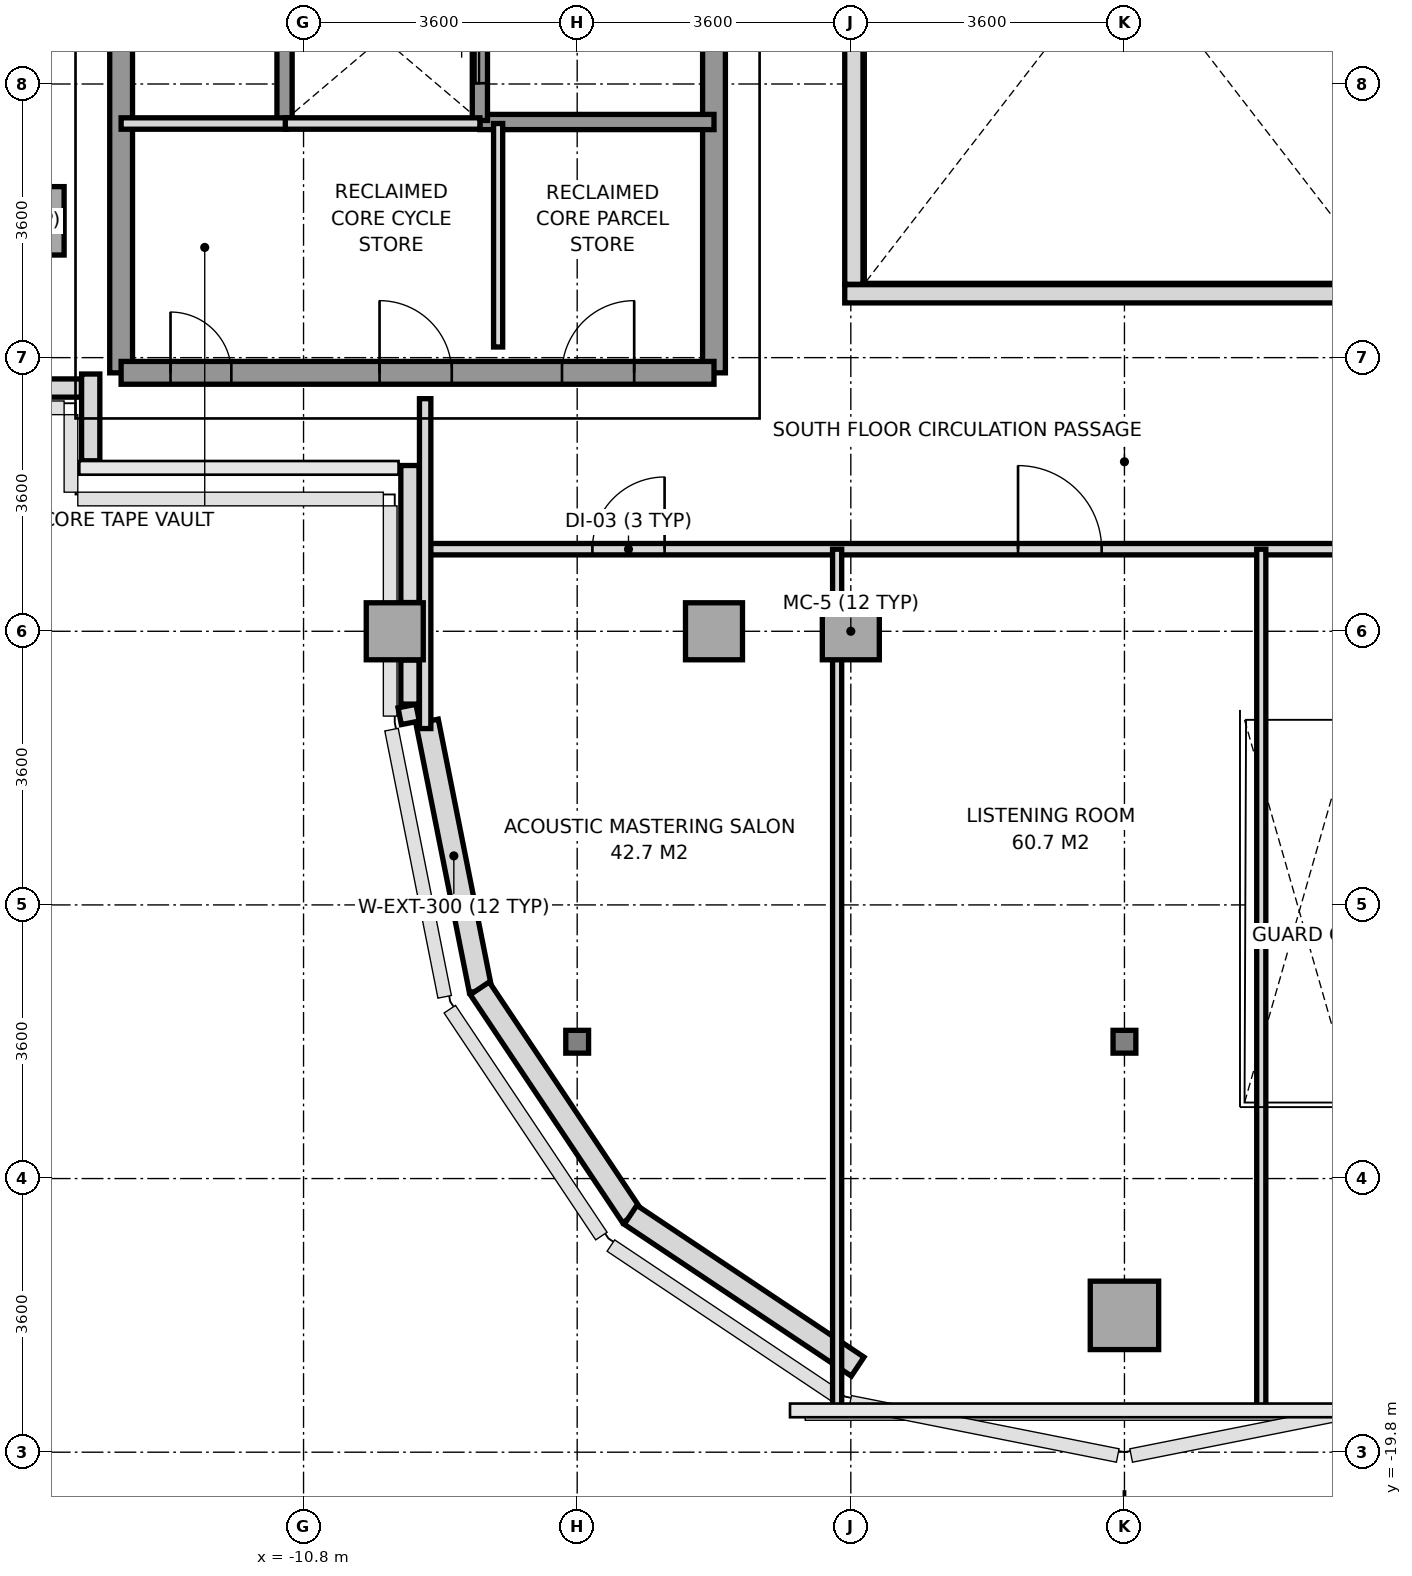
"""IFC4 building model, lengths in metres.
Left out: names, types, materials, properties, quantities, classifications, styles, units other than length and angle.
Written with IfcOpenShell. Run it as: python <this file> out.ifc"""

import sys

from ifc_helpers import new_model, si_unit, direction, frame, frame_2d, origin, origin_2d, place, context, subcontext, project, spatial, rectangle, i_section, extrude, source, transform, mapped, element, fill, save


model = new_model("IFC4")
c1 = context("Model", 3, precision=1e-05, world=origin(), true_north=direction((0.0, 1.0)))
c2 = subcontext(c1, "Body", "Model", "MODEL_VIEW")
j1 = project(units=[si_unit("LENGTHUNIT", "METRE"), si_unit("PLANEANGLEUNIT", "RADIAN")], contexts=[c1])
p1 = place(None, origin())
s1 = spatial("IfcSite", under=j1, at=p1, CompositionType="ELEMENT")
p2 = place(p1, origin())
s2 = spatial("IfcBuilding", under=s1, at=p2, CompositionType="ELEMENT")
p3 = place(p2, frame((0.0, 0.0, 255.6)))
s3 = spatial("IfcBuildingStorey", under=s2, at=p3, CompositionType="ELEMENT", Elevation=255.6)
m1 = source(origin(), c2, "Body", "SweptSolid", [
    extrude(rectangle(XDim=0.9, YDim=0.9, at=origin_2d()), origin(), (0.0, 0.0, 1.0), 3.01),
])
p4 = place(p3, frame((-14.4, -3.6, 0.0), z_axis=(0.0, 0.0, 1.0), x_axis=(1.0, 0.0, 0.0)))
e1 = element("IfcColumn", 1, at=p4, inside=s3, PredefinedType="COLUMN", context=c2, shape_type="MappedRepresentation", body=[
    mapped(m1, transform((0.0, 0.0, 0.0), x_axis=(1.0, 0.0, 0.0), y_axis=(0.0, 1.0, 0.0), z_axis=(0.0, 0.0, 1.0), scale=1.0)),
])
m2 = source(origin(), c2, "Body", "SweptSolid", [
    extrude(rectangle(XDim=0.75, YDim=0.75, at=origin_2d()), origin(), (0.0, 0.0, 1.0), 3.01),
])
p5 = place(p3, frame((-9.6, -9.0, 0.0), z_axis=(0.0, 0.0, 1.0), x_axis=(1.0, 0.0, 0.0)))
e2 = element("IfcColumn", 2, at=p5, inside=s3, PredefinedType="COLUMN", context=c2, shape_type="MappedRepresentation", body=[
    mapped(m2, transform((0.0, 0.0, 0.0), x_axis=(1.0, 0.0, 0.0), y_axis=(0.0, 1.0, 0.0), z_axis=(0.0, 0.0, 1.0), scale=1.0)),
])
m3 = source(origin(), c2, "Body", "SweptSolid", [
    extrude(i_section(OverallWidth=0.3, OverallDepth=0.3, WebThickness=0.011, FlangeThickness=0.019, at=origin_2d()), origin(), (0.0, 0.0, 1.0), 3.01),
])
p6 = place(p3, frame((-7.2, -14.4, 0.0), z_axis=(0.0, 0.0, 1.0), x_axis=(1.0, 0.0, 0.0)))
e3 = element("IfcColumn", 3, at=p6, inside=s3, PredefinedType="COLUMN", context=c2, shape_type="MappedRepresentation", body=[
    mapped(m3, transform((0.0, 0.0, 0.0), x_axis=(1.0, 0.0, 0.0), y_axis=(0.0, 1.0, 0.0), z_axis=(0.0, 0.0, 1.0), scale=1.0)),
])
for number, where, z_axis, x_axis in (
    (4, (-5.4, -9.0, 0.0), (0.0, 0.0, 1.0), (1.0, 0.0, 0.0)),
    (5, (-3.6, -9.0, 0.0), (0.0, 0.0, 1.0), (1.0, 0.0, 0.0)),
):
    element("IfcColumn", number, at=place(p3, frame(where, z_axis=z_axis, x_axis=x_axis)), inside=s3, PredefinedType="COLUMN", context=c2, shape_type="MappedRepresentation", body=[
        mapped(m2, transform((0.0, 0.0, 0.0), x_axis=(1.0, 0.0, 0.0), y_axis=(0.0, 1.0, 0.0), z_axis=(0.0, 0.0, 1.0), scale=1.0)),
    ])
p7 = place(p3, frame((0.0, -18.0, 0.0), z_axis=(0.0, 0.0, 1.0), x_axis=(1.0, 0.0, 0.0)))
e6 = element("IfcColumn", 6, at=p7, inside=s3, PredefinedType="COLUMN", context=c2, shape_type="MappedRepresentation", body=[
    mapped(m1, transform((0.0, 0.0, 0.0), x_axis=(1.0, 0.0, 0.0), y_axis=(0.0, 1.0, 0.0), z_axis=(0.0, 0.0, 1.0), scale=1.0)),
])
p8 = place(p3, frame((0.0, -14.4, 0.0), z_axis=(0.0, 0.0, 1.0), x_axis=(1.0, 0.0, 0.0)))
e7 = element("IfcColumn", 7, at=p8, inside=s3, PredefinedType="COLUMN", context=c2, shape_type="MappedRepresentation", body=[
    mapped(m3, transform((0.0, 0.0, 0.0), x_axis=(1.0, 0.0, 0.0), y_axis=(0.0, 1.0, 0.0), z_axis=(0.0, 0.0, 1.0), scale=1.0)),
])
p9 = place(p3, frame((-9.175, -10.185, 0.0), z_axis=(0.0, 0.0, 1.0), x_axis=(0.195114232679, -0.980780523974, 0.0)))
e8 = element("IfcWall", 8, at=p9, inside=s3, PredefinedType="SOLIDWALL", context=c2, shape_type="SweptSolid", body=[
    extrude(rectangle(XDim=3.609, YDim=0.3, at=frame_2d((1.804, 0.0))), origin(), (0.0, 0.0, 1.0), 3.01),
])
p10 = place(p3, frame((-8.482, -13.698, 0.0), z_axis=(0.0, 0.0, 1.0), x_axis=(0.555574187116, -0.831466970246, 0.0)))
e9 = element("IfcWall", 9, at=p10, inside=s3, PredefinedType="SOLIDWALL", context=c2, shape_type="SweptSolid", body=[
    extrude(rectangle(XDim=3.609, YDim=0.3, at=frame_2d((1.804, 0.0))), origin(), (0.0, 0.0, 1.0), 2.61),
])
p11 = place(p3, frame((-6.498, -16.677, 0.0), z_axis=(0.0, 0.0, 1.0), x_axis=(0.831443568068, -0.555609208993, 0.0)))
e10 = element("IfcWall", 10, at=p11, inside=s3, PredefinedType="SOLIDWALL", context=c2, shape_type="SweptSolid", body=[
    extrude(rectangle(XDim=3.594, YDim=0.3, at=frame_2d((1.797, 0.0))), origin(), (0.0, 0.0, 1.0), 3.01),
])
p12 = place(p3, frame((-9.395, -10.204, 0.0), z_axis=(0.0, 0.0, 1.0), x_axis=(-0.194859894132, 0.980831087221, 0.0)))
e11 = element("IfcWall", 11, at=p12, inside=s3, PredefinedType="PARAPET", context=c2, shape_type="SweptSolid", body=[
    extrude(rectangle(XDim=0.224, YDim=0.24, at=frame_2d((0.112, 0.0))), origin(), (0.0, 0.0, 1.0), 1.15),
])
p13 = place(p3, frame((-9.4, -9.958, 0.0), z_axis=(0.0, 0.0, 1.0), x_axis=(0.0, 1.0, 0.0)))
e12 = element("IfcWall", 12, at=p13, inside=s3, PredefinedType="PARAPET", context=c2, shape_type="SweptSolid", body=[
    extrude(rectangle(XDim=0.58, YDim=0.24, at=frame_2d((0.29, 0.0))), origin(), (0.0, 0.0, 1.0), 1.15),
])
p14 = place(p3, frame((-9.4, -8.622, 0.0), z_axis=(0.0, 0.0, 1.0), x_axis=(0.0, 1.0, 0.0)))
e13 = element("IfcWall", 13, at=p14, inside=s3, PredefinedType="PARAPET", context=c2, shape_type="SweptSolid", body=[
    extrude(rectangle(XDim=1.803, YDim=0.24, at=frame_2d((0.901, 0.0))), origin(), (0.0, 0.0, 1.0), 1.15),
])
p15 = place(p3, frame((-13.6, -6.757, 0.0), z_axis=(0.0, 0.0, 1.0), x_axis=(0.0, 1.0, 0.0)))
e14 = element("IfcWall", 14, at=p15, inside=s3, PredefinedType="PARAPET", context=c2, shape_type="SweptSolid", body=[
    extrude(rectangle(XDim=1.142, YDim=0.24, at=frame_2d((0.571, 0.0))), origin(), (0.0, 0.0, 1.0), 1.15),
])
p16 = place(p3, frame((-13.723, -5.8, 0.0), z_axis=(0.0, 0.0, 1.0), x_axis=(-1.0, 0.0, 0.0)))
e15 = element("IfcWall", 15, at=p16, inside=s3, PredefinedType="PARAPET", context=c2, shape_type="SweptSolid", body=[
    extrude(rectangle(XDim=1.077, YDim=0.24, at=frame_2d((0.539, 0.0))), origin(), (0.0, 0.0, 1.0), 1.15),
])
p17 = place(p3, frame((-13.2, -5.6, 0.0), z_axis=(0.0, 0.0, 1.0), x_axis=(0.0, 1.0, 0.0)))
e16 = element("IfcWall", 16, at=p17, inside=s3, PredefinedType="SHEAR", context=c2, shape_type="SweptSolid", body=[
    extrude(rectangle(XDim=11.2, YDim=0.3, at=frame_2d((5.6, 0.0))), origin(), (0.0, 0.0, 1.0), 3.01),
])
p18 = place(p3, frame((-5.4, -5.6, 0.0), z_axis=(0.0, 0.0, 1.0), x_axis=(0.0, 1.0, 0.0)))
e17 = element("IfcWall", 17, at=p18, inside=s3, PredefinedType="SHEAR", context=c2, shape_type="SweptSolid", body=[
    extrude(rectangle(XDim=12.5, YDim=0.3, at=frame_2d((6.25, 0.0))), origin(), (0.0, 0.0, 1.0), 3.01),
])
p19 = place(p18, frame((4.55, 0.0, 0.0)))
e18 = element("IfcOpeningElement", 18, at=p19, cuts=e17, PredefinedType="OPENING", context=c2, shape_type="SweptSolid", body=[
    extrude(rectangle(XDim=1.2, YDim=2.2, at=frame_2d((0.6, 1.1))), frame((0.0, 0.16, 0.0), z_axis=(0.0, -1.0, 0.0), x_axis=(1.0, 0.0, 0.0)), (0.0, 0.0, 1.0), 0.32),
])
p20 = place(p18, frame((10.45, 0.0, 0.0)))
e19 = element("IfcOpeningElement", 19, at=p20, cuts=e17, PredefinedType="OPENING", context=c2, shape_type="SweptSolid", body=[
    extrude(rectangle(XDim=1.2, YDim=2.2, at=frame_2d((0.6, 1.1))), frame((0.0, 0.16, 0.0), z_axis=(0.0, -1.0, 0.0), x_axis=(1.0, 0.0, 0.0)), (0.0, 0.0, 1.0), 0.32),
])
p21 = place(p18, frame((6.86, 0.0, 0.0)))
e20 = element("IfcOpeningElement", 20, at=p21, cuts=e17, PredefinedType="OPENING", context=c2, shape_type="SweptSolid", body=[
    extrude(rectangle(XDim=0.8, YDim=2.1, at=frame_2d((0.4, 1.05))), frame((0.0, 0.16, 0.0), z_axis=(0.0, -1.0, 0.0), x_axis=(1.0, 0.0, 0.0)), (0.0, 0.0, 1.0), 0.32),
])
p22 = place(p18, frame((7.88, 0.0, 0.0)))
e21 = element("IfcOpeningElement", 21, at=p22, cuts=e17, PredefinedType="OPENING", context=c2, shape_type="SweptSolid", body=[
    extrude(rectangle(XDim=0.8, YDim=2.1, at=frame_2d((0.4, 1.05))), frame((0.0, 0.16, 0.0), z_axis=(0.0, -1.0, 0.0), x_axis=(1.0, 0.0, 0.0)), (0.0, 0.0, 1.0), 0.32),
])
p23 = place(p3, frame((-13.2, -5.6, 0.0), z_axis=(0.0, 0.0, 1.0), x_axis=(1.0, 0.0, 0.0)))
e22 = element("IfcWall", 22, at=p23, inside=s3, PredefinedType="SHEAR", context=c2, shape_type="SweptSolid", body=[
    extrude(rectangle(XDim=7.8, YDim=0.3, at=frame_2d((3.9, 0.0))), origin(), (0.0, 0.0, 1.0), 3.01),
])
p24 = place(p23, frame((0.65, 0.0, 0.0)))
e23 = element("IfcOpeningElement", 23, at=p24, cuts=e22, PredefinedType="OPENING", context=c2, shape_type="SweptSolid", body=[
    extrude(rectangle(XDim=0.8, YDim=2.1, at=frame_2d((0.4, 1.05))), frame((0.0, 0.16, 0.0), z_axis=(0.0, -1.0, 0.0), x_axis=(1.0, 0.0, 0.0)), (0.0, 0.0, 1.0), 0.32),
])
p25 = place(p23, frame((3.4, 0.0, 0.0)))
e24 = element("IfcOpeningElement", 24, at=p25, cuts=e22, PredefinedType="OPENING", context=c2, shape_type="SweptSolid", body=[
    extrude(rectangle(XDim=0.95, YDim=2.15, at=frame_2d((0.475, 1.075))), frame((0.0, 0.16, 0.0), z_axis=(0.0, -1.0, 0.0), x_axis=(1.0, 0.0, 0.0)), (0.0, 0.0, 1.0), 0.32),
])
p26 = place(p23, frame((5.8, 0.0, 0.0)))
e25 = element("IfcOpeningElement", 25, at=p26, cuts=e22, PredefinedType="OPENING", context=c2, shape_type="SweptSolid", body=[
    extrude(rectangle(XDim=0.95, YDim=2.15, at=frame_2d((0.475, 1.075))), frame((0.0, 0.16, 0.0), z_axis=(0.0, -1.0, 0.0), x_axis=(1.0, 0.0, 0.0)), (0.0, 0.0, 1.0), 0.32),
])
p27 = place(p3, frame((-8.48, -2.3, 0.0), z_axis=(0.0, 0.0, 1.0), x_axis=(1.0, 0.0, 0.0)))
e26 = element("IfcWall", 26, at=p27, inside=s3, PredefinedType="SOLIDWALL", context=c2, shape_type="SweptSolid", body=[
    extrude(rectangle(XDim=3.08, YDim=0.2, at=frame_2d((1.54, 0.0))), origin(), (0.0, 0.0, 1.0), 3.01),
])
p28 = place(p3, frame((-11.05, -2.28, 0.0), z_axis=(0.0, 0.0, 1.0), x_axis=(0.0, 1.0, 0.0)))
e27 = element("IfcWall", 27, at=p28, inside=s3, PredefinedType="SOLIDWALL", context=c2, shape_type="SweptSolid", body=[
    extrude(rectangle(XDim=2.18, YDim=0.2, at=frame_2d((1.09, 0.0))), origin(), (0.0, 0.0, 1.0), 3.01),
])
p29 = place(p3, frame((-8.48, -2.28, 0.0), z_axis=(0.0, 0.0, 1.0), x_axis=(0.0, 1.0, 0.0)))
e28 = element("IfcWall", 28, at=p29, inside=s3, PredefinedType="SOLIDWALL", context=c2, shape_type="SweptSolid", body=[
    extrude(rectangle(XDim=2.18, YDim=0.2, at=frame_2d((1.09, 0.0))), origin(), (0.0, 0.0, 1.0), 3.01),
])
p30 = place(p29, frame((0.49, 0.0, 0.0)))
e29 = element("IfcOpeningElement", 29, at=p30, cuts=e28, PredefinedType="OPENING", context=c2, shape_type="SweptSolid", body=[
    extrude(rectangle(XDim=1.2, YDim=2.2, at=frame_2d((0.6, 1.1))), frame((0.0, 0.11, 0.0), z_axis=(0.0, -1.0, 0.0), x_axis=(1.0, 0.0, 0.0)), (0.0, 0.0, 1.0), 0.22),
])
p31 = place(p3, frame((-13.2, -2.32, 0.0), z_axis=(0.0, 0.0, 1.0), x_axis=(1.0, 0.0, 0.0)))
e30 = element("IfcWall", 30, at=p31, inside=s3, PredefinedType="PARTITIONING", context=c2, shape_type="SweptSolid", body=[
    extrude(rectangle(XDim=2.18, YDim=0.15, at=frame_2d((1.09, 0.0))), origin(), (0.0, 0.0, 1.0), 3.01),
])
p32 = place(p3, frame((-8.24, -5.26, 0.0), z_axis=(0.0, 0.0, 1.0), x_axis=(0.0, 1.0, 0.0)))
e31 = element("IfcWall", 31, at=p32, inside=s3, PredefinedType="PARTITIONING", context=c2, shape_type="SweptSolid", body=[
    extrude(rectangle(XDim=2.94, YDim=0.12, at=frame_2d((1.47, 0.0))), origin(), (0.0, 0.0, 1.0), 3.01),
])
p33 = place(p3, frame((-11.04, -2.32, 0.0), z_axis=(0.0, 0.0, 1.0), x_axis=(1.0, 0.0, 0.0)))
e32 = element("IfcWall", 32, at=p33, inside=s3, PredefinedType="PARTITIONING", context=c2, shape_type="SweptSolid", body=[
    extrude(rectangle(XDim=2.56, YDim=0.15, at=frame_2d((1.28, 0.0))), origin(), (0.0, 0.0, 1.0), 3.01),
])
p34 = place(p3, frame((-9.2, -7.92, 0.0), z_axis=(0.0, 0.0, 1.0), x_axis=(1.0, 0.0, 0.0)))
e33 = element("IfcWall", 33, at=p34, inside=s3, PredefinedType="PARTITIONING", context=c2, shape_type="SweptSolid", body=[
    extrude(rectangle(XDim=18.4, YDim=0.15, at=frame_2d((9.2, 0.0))), origin(), (0.0, 0.0, 1.0), 2.57),
])
p35 = place(p34, frame((2.2, 0.0, 0.0)))
e34 = element("IfcOpeningElement", 34, at=p35, cuts=e33, PredefinedType="OPENING", context=c2, shape_type="SweptSolid", body=[
    extrude(rectangle(XDim=0.95, YDim=2.15, at=frame_2d((0.475, 1.075))), frame((0.0, 0.085, 0.0), z_axis=(0.0, -1.0, 0.0), x_axis=(1.0, 0.0, 0.0)), (0.0, 0.0, 1.0), 0.17),
])
p36 = place(p34, frame((7.8, 0.0, 0.0)))
e35 = element("IfcOpeningElement", 35, at=p36, cuts=e33, PredefinedType="OPENING", context=c2, shape_type="SweptSolid", body=[
    extrude(rectangle(XDim=1.1, YDim=2.2, at=frame_2d((0.55, 1.1))), frame((0.0, 0.085, 0.0), z_axis=(0.0, -1.0, 0.0), x_axis=(1.0, 0.0, 0.0)), (0.0, 0.0, 1.0), 0.17),
])
p37 = place(p34, frame((15.35, 0.0, 0.0)))
e36 = element("IfcOpeningElement", 36, at=p37, cuts=e33, PredefinedType="OPENING", context=c2, shape_type="SweptSolid", body=[
    extrude(rectangle(XDim=0.95, YDim=2.15, at=frame_2d((0.475, 1.075))), frame((0.0, 0.085, 0.0), z_axis=(0.0, -1.0, 0.0), x_axis=(1.0, 0.0, 0.0)), (0.0, 0.0, 1.0), 0.17),
])
p38 = place(p3, frame((-9.2, -10.28, 0.0), z_axis=(0.0, 0.0, 1.0), x_axis=(0.0, 1.0, 0.0)))
e37 = element("IfcWall", 37, at=p38, inside=s3, PredefinedType="PARTITIONING", context=c2, shape_type="SweptSolid", body=[
    extrude(rectangle(XDim=4.34, YDim=0.15, at=frame_2d((2.17, 0.0))), origin(), (0.0, 0.0, 1.0), 2.61),
])
p39 = place(p3, frame((-3.78, -19.25, 0.0), z_axis=(0.0, 0.0, 1.0), x_axis=(0.0, 1.0, 0.0)))
e38 = element("IfcWall", 38, at=p39, inside=s3, PredefinedType="PARTITIONING", context=c2, shape_type="SweptSolid", body=[
    extrude(rectangle(XDim=11.33, YDim=0.12, at=frame_2d((5.665, 0.0))), origin(), (0.0, 0.0, 1.0), 2.57),
])
p40 = place(p3, frame((1.8, -19.25, 0.0), z_axis=(0.0, 0.0, 1.0), x_axis=(0.0, 1.0, 0.0)))
e39 = element("IfcWall", 39, at=p40, inside=s3, PredefinedType="PARTITIONING", context=c2, shape_type="SweptSolid", body=[
    extrude(rectangle(XDim=11.33, YDim=0.12, at=frame_2d((5.665, 0.0))), origin(), (0.0, 0.0, 1.0), 2.61),
])
p41 = place(p3, frame((-3.68, -4.56, 0.0), z_axis=(0.0, 0.0, 1.0), x_axis=(1.0, 0.0, 0.0)))
e40 = element("IfcWall", 40, at=p41, inside=s3, PredefinedType="PARAPET", context=c2, shape_type="SweptSolid", body=[
    extrude(rectangle(XDim=7.36, YDim=0.24, at=frame_2d((3.68, 0.0))), origin(), (0.0, 0.0, 1.0), 1.15),
])
p42 = place(p3, frame((-3.56, -4.435, 0.0), z_axis=(0.0, 0.0, 1.0), x_axis=(0.0, 1.0, 0.0)))
e41 = element("IfcWall", 41, at=p42, inside=s3, PredefinedType="PARAPET", context=c2, shape_type="SweptSolid", body=[
    extrude(rectangle(XDim=8.87, YDim=0.24, at=frame_2d((4.435, 0.0))), origin(), (0.0, 0.0, 1.0), 1.15),
])
m4 = source(origin(), c2, "Body", "SweptSolid", [
    extrude(rectangle(XDim=0.8, YDim=2.1, at=frame_2d((0.4, 1.05))), frame((0.0, 0.025, 0.0), z_axis=(0.0, -1.0, 0.0), x_axis=(1.0, 0.0, 0.0)), (0.0, 0.0, 1.0), 0.05),
])
p43 = place(p24, origin())
e42 = element("IfcDoor", 42, at=p43, inside=s3, OperationType="SINGLE_SWING_LEFT", PredefinedType="DOOR", context=c2, shape_type="MappedRepresentation", body=[
    mapped(m4, transform((0.0, 0.0, 0.0), x_axis=(1.0, 0.0, 0.0), y_axis=(0.0, 1.0, 0.0), z_axis=(0.0, 0.0, 1.0), scale=1.0)),
])
fill(e23, e42)
m5 = source(origin(), c2, "Body", "SweptSolid", [
    extrude(rectangle(XDim=0.95, YDim=2.15, at=frame_2d((0.475, 1.075))), frame((0.0, 0.025, 0.0), z_axis=(0.0, -1.0, 0.0), x_axis=(1.0, 0.0, 0.0)), (0.0, 0.0, 1.0), 0.05),
])
p44 = place(p25, origin())
e43 = element("IfcDoor", 43, at=p44, inside=s3, OperationType="SINGLE_SWING_LEFT", PredefinedType="DOOR", context=c2, shape_type="MappedRepresentation", body=[
    mapped(m5, transform((0.0, 0.0, 0.0), x_axis=(1.0, 0.0, 0.0), y_axis=(0.0, 1.0, 0.0), z_axis=(0.0, 0.0, 1.0), scale=1.0)),
])
fill(e24, e43)
p45 = place(p26, origin())
e44 = element("IfcDoor", 44, at=p45, inside=s3, OperationType="SINGLE_SWING_RIGHT", PredefinedType="DOOR", context=c2, shape_type="MappedRepresentation", body=[
    mapped(m5, transform((0.0, 0.0, 0.0), x_axis=(1.0, 0.0, 0.0), y_axis=(0.0, 1.0, 0.0), z_axis=(0.0, 0.0, 1.0), scale=1.0)),
])
fill(e25, e44)
m6 = source(origin(), c2, "Body", "SweptSolid", [
    extrude(rectangle(XDim=1.2, YDim=2.2, at=frame_2d((0.6, 1.1))), frame((0.0, 0.025, 0.0), z_axis=(0.0, -1.0, 0.0), x_axis=(1.0, 0.0, 0.0)), (0.0, 0.0, 1.0), 0.05),
])
p46 = place(p30, origin())
e45 = element("IfcDoor", 45, at=p46, inside=s3, OperationType="SLIDING_TO_RIGHT", PredefinedType="DOOR", context=c2, shape_type="MappedRepresentation", body=[
    mapped(m6, transform((0.0, 0.0, 0.0), x_axis=(1.0, 0.0, 0.0), y_axis=(0.0, 1.0, 0.0), z_axis=(0.0, 0.0, 1.0), scale=1.0)),
])
fill(e29, e45)
p47 = place(p35, origin())
e46 = element("IfcDoor", 46, at=p47, inside=s3, OperationType="SINGLE_SWING_RIGHT", PredefinedType="DOOR", context=c2, shape_type="MappedRepresentation", body=[
    mapped(m5, transform((0.0, 0.0, 0.0), x_axis=(1.0, 0.0, 0.0), y_axis=(0.0, 1.0, 0.0), z_axis=(0.0, 0.0, 1.0), scale=1.0)),
])
fill(e34, e46)
m7 = source(origin(), c2, "Body", "SweptSolid", [
    extrude(rectangle(XDim=1.1, YDim=2.2, at=frame_2d((0.55, 1.1))), frame((0.0, 0.025, 0.0), z_axis=(0.0, -1.0, 0.0), x_axis=(1.0, 0.0, 0.0)), (0.0, 0.0, 1.0), 0.05),
])
p48 = place(p36, origin())
e47 = element("IfcDoor", 47, at=p48, inside=s3, OperationType="SINGLE_SWING_LEFT", PredefinedType="DOOR", context=c2, shape_type="MappedRepresentation", body=[
    mapped(m7, transform((0.0, 0.0, 0.0), x_axis=(1.0, 0.0, 0.0), y_axis=(0.0, 1.0, 0.0), z_axis=(0.0, 0.0, 1.0), scale=1.0)),
])
fill(e35, e47)
save(model, sys.argv[1])
